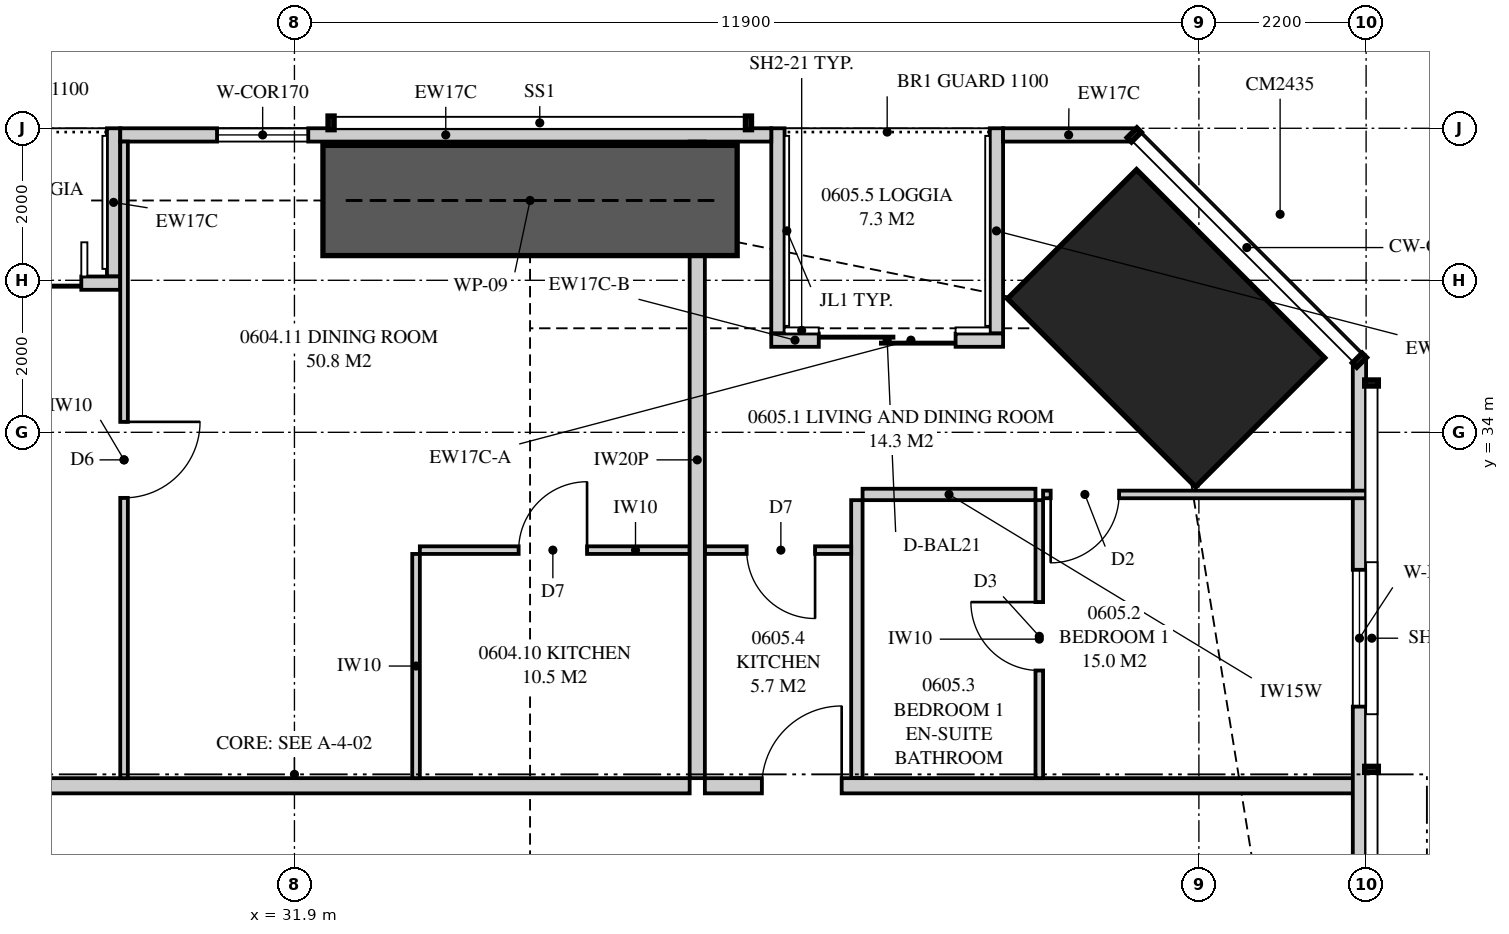
"""IFC4 building model, lengths in metres.
Left out: names, types, materials, properties, quantities, classifications, styles, units other than length and angle.
Written with IfcOpenShell. Run it as: python <this file> out.ifc"""

import sys

from ifc_helpers import new_model, si_unit, direction, frame, frame_2d, origin, origin_2d, place, context, subcontext, project, spatial, polyline, rectangle, outline, extrude, element, fill, save


model = new_model("IFC4")
c1 = context("Model", 3, precision=1e-05, world=origin(), true_north=direction((0.0, 1.0)))
c2 = subcontext(c1, "Body", "Model", "MODEL_VIEW")
j1 = project(units=[si_unit("LENGTHUNIT", "METRE"), si_unit("PLANEANGLEUNIT", "RADIAN")], contexts=[c1])
p1 = place(None, origin())
s1 = spatial("IfcSite", under=j1, at=p1, CompositionType="ELEMENT")
p2 = place(p1, origin())
s2 = spatial("IfcBuilding", under=s1, at=p2, CompositionType="ELEMENT")
p3 = place(p2, frame((0.0, 0.0, 27.7)))
s3 = spatial("IfcBuildingStorey", under=s2, at=p3, CompositionType="ELEMENT", Elevation=27.7)
p4 = place(p3, frame((43.369, 35.369, 0.0), z_axis=(0.0, 0.0, 1.0), x_axis=(-0.707106781187, -0.707106781187, 0.0)))
e1 = element("IfcColumn", 1, at=p4, inside=s3, PredefinedType="COLUMN", context=c2, shape_type="SweptSolid", body=[
    extrude(rectangle(XDim=2.4, YDim=3.5, at=origin_2d()), origin(), (0.0, 0.0, 1.0), 3.35),
])
p5 = place(p3, frame((45.913, 3.051, 0.0), z_axis=(0.0, 0.0, 1.0), x_axis=(0.0, 1.0, 0.0)))
e2 = element("IfcWall", 2, at=p5, inside=s3, PredefinedType="SOLIDWALL", context=c2, shape_type="SweptSolid", body=[
    extrude(outline(polyline([(0.0, 0.0), (31.897, 0.0), (31.897, 3.11), (22.167, 3.11), (22.167, 2.15), (22.074, 2.15), (22.074, 3.11), (21.949, 3.11), (21.949, 2.15), (9.949, 2.15), (9.949, 3.11), (9.823, 3.11), (9.823, 2.15), (9.73, 2.15), (9.73, 3.11), (0.0, 3.11), (0.0, 0.0)])), frame((0.0, 0.087, 0.0), z_axis=(0.0, -1.0, 0.0), x_axis=(1.0, 0.0, 0.0)), (0.0, 0.0, 1.0), 0.175),
])
p6 = place(p5, frame((2.257, 0.0, 0.4)))
e3 = element("IfcOpeningElement", 3, at=p6, cuts=e2, PredefinedType="OPENING", context=c2, shape_type="SweptSolid", body=[
    extrude(rectangle(XDim=1.8, YDim=1.7, at=frame_2d((0.9, 0.85))), frame((0.0, 0.097, 0.0), z_axis=(0.0, -1.0, 0.0), x_axis=(1.0, 0.0, 0.0)), (0.0, 0.0, 1.0), 0.195),
])
p7 = place(p5, frame((14.849, 0.0, 0.4)))
e4 = element("IfcOpeningElement", 4, at=p7, cuts=e2, PredefinedType="OPENING", context=c2, shape_type="SweptSolid", body=[
    extrude(rectangle(XDim=1.2, YDim=1.7, at=frame_2d((0.6, 0.85))), frame((0.0, 0.097, 0.0), z_axis=(0.0, -1.0, 0.0), x_axis=(1.0, 0.0, 0.0)), (0.0, 0.0, 1.0), 0.195),
])
p8 = place(p5, frame((27.34, 0.0, 0.4)))
e5 = element("IfcOpeningElement", 5, at=p8, cuts=e2, PredefinedType="OPENING", context=c2, shape_type="SweptSolid", body=[
    extrude(rectangle(XDim=1.8, YDim=1.7, at=frame_2d((0.9, 0.85))), frame((0.0, 0.097, 0.0), z_axis=(0.0, -1.0, 0.0), x_axis=(1.0, 0.0, 0.0)), (0.0, 0.0, 1.0), 0.195),
])
p9 = place(p3, frame((42.949, 37.913, 0.0), z_axis=(0.0, 0.0, 1.0), x_axis=(-1.0, 0.0, 0.0)))
e6 = element("IfcWall", 6, at=p9, inside=s3, PredefinedType="SOLIDWALL", context=c2, shape_type="SweptSolid", body=[
    extrude(rectangle(XDim=1.725, YDim=0.175, at=frame_2d((0.863, 0.0))), origin(), (0.0, 0.0, 1.0), 3.11),
])
p10 = place(p3, frame((38.174, 37.913, 0.0), z_axis=(0.0, 0.0, 1.0), x_axis=(-1.0, 0.0, 0.0)))
e7 = element("IfcWall", 7, at=p10, inside=s3, PredefinedType="SOLIDWALL", context=c2, shape_type="SweptSolid", body=[
    extrude(outline(polyline([(0.0, 0.0), (8.565, 0.0), (8.565, 2.15), (3.174, 2.15), (3.174, 3.11), (3.018, 3.11), (3.018, 2.15), (2.97, 2.15), (2.97, 3.11), (0.0, 3.11), (0.0, 0.0)])), frame((0.0, 0.087, 0.0), z_axis=(0.0, -1.0, 0.0), x_axis=(1.0, 0.0, 0.0)), (0.0, 0.0, 1.0), 0.175),
])
p11 = place(p10, frame((6.092, 0.0, 0.4)))
e8 = element("IfcOpeningElement", 8, at=p11, cuts=e7, PredefinedType="OPENING", context=c2, shape_type="SweptSolid", body=[
    extrude(rectangle(XDim=1.2, YDim=1.7, at=frame_2d((0.6, 0.85))), frame((0.0, 0.097, 0.0), z_axis=(0.0, -1.0, 0.0), x_axis=(1.0, 0.0, 0.0)), (0.0, 0.0, 1.0), 0.195),
])
p12 = place(p3, frame((41.224, 35.212, 0.0), z_axis=(0.0, 0.0, 1.0), x_axis=(-1.0, 0.0, 0.0)))
e9 = element("IfcWall", 9, at=p12, inside=s3, PredefinedType="SOLIDWALL", context=c2, shape_type="SweptSolid", body=[
    extrude(rectangle(XDim=2.425, YDim=0.175, at=frame_2d((1.212, 0.0))), origin(), (0.0, 0.0, 1.0), 2.15),
])
p13 = place(p12, frame((0.625, 0.0, 0.0)))
e10 = element("IfcOpeningElement", 10, at=p13, cuts=e9, PredefinedType="OPENING", context=c2, shape_type="SweptSolid", body=[
    extrude(rectangle(XDim=1.8, YDim=2.1, at=frame_2d((0.9, 1.05))), frame((0.0, 0.097, 0.0), z_axis=(0.0, -1.0, 0.0), x_axis=(1.0, 0.0, 0.0)), (0.0, 0.0, 1.0), 0.195),
])
p14 = place(p3, frame((38.799, 35.212, 0.0), z_axis=(0.0, 0.0, 1.0), x_axis=(-1.0, 0.0, 0.0)))
e11 = element("IfcWall", 11, at=p14, inside=s3, PredefinedType="SOLIDWALL", context=c2, shape_type="SweptSolid", body=[
    extrude(rectangle(XDim=0.625, YDim=0.175, at=frame_2d((0.312, 0.0))), origin(), (0.0, 0.0, 1.0), 2.51),
])
p15 = place(p3, frame((41.136, 38.0, 0.0), z_axis=(0.0, 0.0, 1.0), x_axis=(0.0, -1.0, 0.0)))
e12 = element("IfcWall", 12, at=p15, inside=s3, PredefinedType="SOLIDWALL", context=c2, shape_type="SweptSolid", body=[
    extrude(outline(polyline([(0.0, 0.0), (2.7, 0.0), (2.7, 2.15), (1.349, 2.15), (1.349, 3.11), (0.0, 3.11), (0.0, 0.0)])), frame((0.0, 0.087, 0.0), z_axis=(0.0, -1.0, 0.0), x_axis=(1.0, 0.0, 0.0)), (0.0, 0.0, 1.0), 0.175),
])
p16 = place(p3, frame((38.261, 38.0, 0.0), z_axis=(0.0, 0.0, 1.0), x_axis=(0.0, -1.0, 0.0)))
e13 = element("IfcWall", 13, at=p16, inside=s3, PredefinedType="SOLIDWALL", context=c2, shape_type="SweptSolid", body=[
    extrude(outline(polyline([(0.0, 0.0), (2.7, 0.0), (2.7, 2.51), (2.439, 2.51), (2.439, 2.15), (0.772, 2.15), (0.772, 3.11), (0.0, 3.11), (0.0, 0.0)])), frame((0.0, 0.087, 0.0), z_axis=(0.0, -1.0, 0.0), x_axis=(1.0, 0.0, 0.0)), (0.0, 0.0, 1.0), 0.175),
])
p17 = place(p3, frame((29.608, 35.962, 0.0), z_axis=(0.0, 0.0, 1.0), x_axis=(-1.0, 0.0, 0.0)))
e14 = element("IfcWall", 14, at=p17, inside=s3, PredefinedType="SOLIDWALL", context=c2, shape_type="SweptSolid", body=[
    extrude(rectangle(XDim=2.825, YDim=0.175, at=frame_2d((1.413, 0.0))), origin(), (0.0, 0.0, 1.0), 3.11),
])
p18 = place(p17, frame((0.512, 0.0, 0.0)))
e15 = element("IfcOpeningElement", 15, at=p18, cuts=e14, PredefinedType="OPENING", context=c2, shape_type="SweptSolid", body=[
    extrude(rectangle(XDim=1.8, YDim=2.1, at=frame_2d((0.9, 1.05))), frame((0.0, 0.097, 0.0), z_axis=(0.0, -1.0, 0.0), x_axis=(1.0, 0.0, 0.0)), (0.0, 0.0, 1.0), 0.195),
])
p19 = place(p3, frame((29.521, 38.0, 0.0), z_axis=(0.0, 0.0, 1.0), x_axis=(0.0, -1.0, 0.0)))
e16 = element("IfcWall", 16, at=p19, inside=s3, PredefinedType="SOLIDWALL", context=c2, shape_type="SweptSolid", body=[
    extrude(outline(polyline([(0.0, 0.0), (1.95, 0.0), (1.95, 3.11), (1.75, 3.11), (1.75, 2.15), (0.15, 2.15), (0.15, 3.11), (0.0, 3.11), (0.0, 0.0)])), frame((0.0, 0.087, 0.0), z_axis=(0.0, -1.0, 0.0), x_axis=(1.0, 0.0, 0.0)), (0.0, 0.0, 1.0), 0.175),
])
p20 = place(p3, frame((37.2, 37.825, 0.0), z_axis=(0.0, 0.0, 1.0), x_axis=(0.0, -1.0, 0.0)))
e17 = element("IfcWall", 17, at=p20, inside=s3, PredefinedType="PARTITIONING", context=c2, shape_type="SweptSolid", body=[
    extrude(outline(polyline([(0.0, 0.0), (8.375, 0.0), (8.375, 3.11), (3.766, 3.11), (3.766, 2.51), (2.145, 2.51), (2.145, 2.15), (0.289, 2.15), (0.289, 3.11), (0.0, 3.11), (0.0, 0.0)])), frame((0.0, 0.1, 0.0), z_axis=(0.0, -1.0, 0.0), x_axis=(1.0, 0.0, 0.0)), (0.0, 0.0, 1.0), 0.2),
])
p21 = place(p3, frame((33.55, 32.45, 0.0), z_axis=(0.0, 0.0, 1.0), x_axis=(1.0, 0.0, 0.0)))
e18 = element("IfcWall", 18, at=p21, inside=s3, PredefinedType="PARTITIONING", context=c2, shape_type="SweptSolid", body=[
    extrude(outline(polyline([(0.0, 0.0), (3.55, 0.0), (3.55, 3.11), (1.737, 3.11), (1.737, 2.541), (1.163, 2.541), (1.163, 3.11), (0.0, 3.11), (0.0, 0.0)])), frame((0.0, 0.05, 0.0), z_axis=(0.0, -1.0, 0.0), x_axis=(1.0, 0.0, 0.0)), (0.0, 0.0, 1.0), 0.1),
])
p22 = place(p21, frame((1.3, 0.0, 0.0)))
e19 = element("IfcOpeningElement", 19, at=p22, cuts=e18, PredefinedType="OPENING", context=c2, shape_type="SweptSolid", body=[
    extrude(rectangle(XDim=0.9, YDim=2.1, at=frame_2d((0.45, 1.05))), frame((0.0, 0.06, 0.0), z_axis=(0.0, -1.0, 0.0), x_axis=(1.0, 0.0, 0.0)), (0.0, 0.0, 1.0), 0.12),
])
p23 = place(p3, frame((33.5, 32.4, 0.0), z_axis=(0.0, 0.0, 1.0), x_axis=(0.0, -1.0, 0.0)))
e20 = element("IfcWall", 20, at=p23, inside=s3, PredefinedType="PARTITIONING", context=c2, shape_type="SweptSolid", body=[
    extrude(rectangle(XDim=2.95, YDim=0.1, at=frame_2d((1.475, 0.0))), origin(), (0.0, 0.0, 1.0), 3.11),
])
p24 = place(p3, frame((29.658, 37.825, 0.0), z_axis=(0.0, 0.0, 1.0), x_axis=(0.0, -1.0, 0.0)))
e21 = element("IfcWall", 21, at=p24, inside=s3, PredefinedType="PARTITIONING", context=c2, shape_type="SweptSolid", body=[
    extrude(outline(polyline([(0.0, 0.0), (8.375, 0.0), (8.375, 3.11), (1.635, 3.11), (1.635, 2.15), (0.0, 2.15), (0.0, 3.11), (0.0, 0.0)])), frame((0.0, 0.05, 0.0), z_axis=(0.0, -1.0, 0.0), x_axis=(1.0, 0.0, 0.0)), (0.0, 0.0, 1.0), 0.1),
])
p25 = place(p24, frame((3.688, 0.0, 0.0)))
e22 = element("IfcOpeningElement", 22, at=p25, cuts=e21, PredefinedType="OPENING", context=c2, shape_type="SweptSolid", body=[
    extrude(rectangle(XDim=1.0, YDim=2.1, at=frame_2d((0.5, 1.05))), frame((0.0, 0.06, 0.0), z_axis=(0.0, -1.0, 0.0), x_axis=(1.0, 0.0, 0.0)), (0.0, 0.0, 1.0), 0.12),
])
p26 = place(p3, frame((37.3, 29.35, 0.0), z_axis=(0.0, 0.0, 1.0), x_axis=(1.0, 0.0, 0.0)))
e23 = element("IfcWall", 23, at=p26, inside=s3, PredefinedType="PARTITIONING", context=c2, shape_type="SweptSolid", body=[
    extrude(outline(polyline([(0.0, 0.0), (8.7, 0.0), (8.7, 3.11), (7.967, 3.11), (7.967, 2.15), (6.123, 2.15), (6.123, 3.11), (0.0, 3.11), (0.0, 0.0)])), frame((0.0, 0.1, 0.0), z_axis=(0.0, -1.0, 0.0), x_axis=(1.0, 0.0, 0.0)), (0.0, 0.0, 1.0), 0.2),
])
p27 = place(p26, frame((0.75, 0.0, 0.0)))
e24 = element("IfcOpeningElement", 24, at=p27, cuts=e23, PredefinedType="OPENING", context=c2, shape_type="SweptSolid", body=[
    extrude(rectangle(XDim=1.05, YDim=2.2, at=frame_2d((0.525, 1.1))), frame((0.0, 0.11, 0.0), z_axis=(0.0, -1.0, 0.0), x_axis=(1.0, 0.0, 0.0)), (0.0, 0.0, 1.0), 0.22),
])
p28 = place(p3, frame((41.7, 33.108, 0.0), z_axis=(0.0, 0.0, 1.0), x_axis=(0.0, -1.0, 0.0)))
e25 = element("IfcWall", 25, at=p28, inside=s3, PredefinedType="PARTITIONING", context=c2, shape_type="SweptSolid", body=[
    extrude(rectangle(XDim=3.658, YDim=0.1, at=frame_2d((1.829, 0.0))), origin(), (0.0, 0.0, 1.0), 3.11),
])
p29 = place(p28, frame((1.341, 0.0, 0.0)))
e26 = element("IfcOpeningElement", 26, at=p29, cuts=e25, PredefinedType="OPENING", context=c2, shape_type="SweptSolid", body=[
    extrude(rectangle(XDim=0.9, YDim=2.1, at=frame_2d((0.45, 1.05))), frame((0.0, 0.06, 0.0), z_axis=(0.0, -1.0, 0.0), x_axis=(1.0, 0.0, 0.0)), (0.0, 0.0, 1.0), 0.12),
])
p30 = place(p3, frame((41.75, 33.183, 0.0), z_axis=(0.0, 0.0, 1.0), x_axis=(1.0, 0.0, 0.0)))
e27 = element("IfcWall", 27, at=p30, inside=s3, PredefinedType="PARTITIONING", context=c2, shape_type="SweptSolid", body=[
    extrude(outline(polyline([(0.0, 0.0), (4.25, 0.0), (4.25, 3.11), (2.844, 3.11), (2.844, 2.15), (1.102, 2.15), (1.102, 3.11), (0.0, 3.11), (0.0, 0.0)])), frame((0.0, 0.05, 0.0), z_axis=(0.0, -1.0, 0.0), x_axis=(1.0, 0.0, 0.0)), (0.0, 0.0, 1.0), 0.1),
])
p31 = place(p30, frame((0.1, 0.0, 0.0)))
e28 = element("IfcOpeningElement", 28, at=p31, cuts=e27, PredefinedType="OPENING", context=c2, shape_type="SweptSolid", body=[
    extrude(rectangle(XDim=0.9, YDim=2.1, at=frame_2d((0.45, 1.05))), frame((0.0, 0.06, 0.0), z_axis=(0.0, -1.0, 0.0), x_axis=(1.0, 0.0, 0.0)), (0.0, 0.0, 1.0), 0.12),
])
p32 = place(p3, frame((39.375, 33.183, 0.0), z_axis=(0.0, 0.0, 1.0), x_axis=(1.0, 0.0, 0.0)))
e29 = element("IfcWall", 29, at=p32, inside=s3, PredefinedType="PLUMBINGWALL", context=c2, shape_type="SweptSolid", body=[
    extrude(rectangle(XDim=2.275, YDim=0.15, at=frame_2d((1.137, 0.0))), origin(), (0.0, 0.0, 1.0), 3.11),
])
p33 = place(p3, frame((39.3, 33.108, 0.0), z_axis=(0.0, 0.0, 1.0), x_axis=(0.0, -1.0, 0.0)))
e30 = element("IfcWall", 30, at=p33, inside=s3, PredefinedType="PLUMBINGWALL", context=c2, shape_type="SweptSolid", body=[
    extrude(rectangle(XDim=3.658, YDim=0.15, at=frame_2d((1.829, 0.0))), origin(), (0.0, 0.0, 1.0), 3.11),
])
p34 = place(p3, frame((37.3, 32.45, 0.0), z_axis=(0.0, 0.0, 1.0), x_axis=(1.0, 0.0, 0.0)))
e31 = element("IfcWall", 31, at=p34, inside=s3, PredefinedType="PARTITIONING", context=c2, shape_type="SweptSolid", body=[
    extrude(rectangle(XDim=1.925, YDim=0.1, at=frame_2d((0.962, 0.0))), origin(), (0.0, 0.0, 1.0), 3.11),
])
p35 = place(p34, frame((0.55, 0.0, 0.0)))
e32 = element("IfcOpeningElement", 32, at=p35, cuts=e31, PredefinedType="OPENING", context=c2, shape_type="SweptSolid", body=[
    extrude(rectangle(XDim=0.9, YDim=2.1, at=frame_2d((0.45, 1.05))), frame((0.0, 0.06, 0.0), z_axis=(0.0, -1.0, 0.0), x_axis=(1.0, 0.0, 0.0)), (0.0, 0.0, 1.0), 0.12),
])
p36 = place(p3, frame((24.05, 29.35, 0.0), z_axis=(0.0, 0.0, 1.0), x_axis=(1.0, 0.0, 0.0)))
e33 = element("IfcWall", 33, at=p36, inside=s3, PredefinedType="PARTITIONING", context=c2, shape_type="SweptSolid", body=[
    extrude(outline(polyline([(0.0, 0.0), (13.05, 0.0), (13.05, 3.11), (11.287, 3.11), (11.287, 2.541), (10.613, 2.541), (10.613, 3.11), (0.287, 3.11), (0.287, 2.541), (0.0, 2.541), (0.0, 3.11), (0.0, 0.0)])), frame((0.0, 0.1, 0.0), z_axis=(0.0, -1.0, 0.0), x_axis=(1.0, 0.0, 0.0)), (0.0, 0.0, 1.0), 0.2),
])
p37 = place(p3, frame((32.275, 37.05, 0.0), z_axis=(0.0, 0.0, 1.0), x_axis=(1.0, 0.0, 0.0)))
e34 = element("IfcWall", 34, at=p37, inside=s3, PredefinedType="SHEAR", context=c2, shape_type="SweptSolid", body=[
    extrude(rectangle(XDim=5.45, YDim=1.45, at=frame_2d((2.725, 0.0))), origin(), (0.0, 0.0, 1.0), 3.35),
])
p38 = place(p8, origin())
e35 = element("IfcWindow", 35, at=p38, inside=s3, PartitioningType="SINGLE_PANEL", PredefinedType="WINDOW", context=c2, shape_type="SweptSolid", body=[
    extrude(rectangle(XDim=1.8, YDim=1.7, at=frame_2d((0.9, 0.85))), frame((0.0, 0.03, 0.0), z_axis=(0.0, -1.0, 0.0), x_axis=(1.0, 0.0, 0.0)), (0.0, 0.0, 1.0), 0.06),
])
fill(e5, e35)
p39 = place(p13, origin())
e36 = element("IfcDoor", 36, at=p39, inside=s3, OperationType="SLIDING_TO_LEFT", PredefinedType="DOOR", context=c2, shape_type="SweptSolid", body=[
    extrude(rectangle(XDim=1.8, YDim=2.1, at=frame_2d((0.9, 1.05))), frame((0.0, 0.025, 0.0), z_axis=(0.0, -1.0, 0.0), x_axis=(1.0, 0.0, 0.0)), (0.0, 0.0, 1.0), 0.05),
])
fill(e10, e36)
p40 = place(p11, origin())
e37 = element("IfcWindow", 37, at=p40, inside=s3, PartitioningType="SINGLE_PANEL", PredefinedType="WINDOW", context=c2, shape_type="SweptSolid", body=[
    extrude(rectangle(XDim=1.2, YDim=1.7, at=frame_2d((0.6, 0.85))), frame((0.0, 0.03, 0.0), z_axis=(0.0, -1.0, 0.0), x_axis=(1.0, 0.0, 0.0)), (0.0, 0.0, 1.0), 0.06),
])
fill(e8, e37)
p41 = place(p18, origin())
e38 = element("IfcDoor", 38, at=p41, inside=s3, OperationType="SLIDING_TO_LEFT", PredefinedType="DOOR", context=c2, shape_type="SweptSolid", body=[
    extrude(rectangle(XDim=1.8, YDim=2.1, at=frame_2d((0.9, 1.05))), frame((0.0, 0.025, 0.0), z_axis=(0.0, -1.0, 0.0), x_axis=(1.0, 0.0, 0.0)), (0.0, 0.0, 1.0), 0.05),
])
fill(e15, e38)
p42 = place(p22, origin())
e39 = element("IfcDoor", 39, at=p42, inside=s3, OperationType="SINGLE_SWING_RIGHT", PredefinedType="DOOR", context=c2, shape_type="SweptSolid", body=[
    extrude(rectangle(XDim=0.9, YDim=2.1, at=frame_2d((0.45, 1.05))), frame((0.0, 0.025, 0.0), z_axis=(0.0, -1.0, 0.0), x_axis=(1.0, 0.0, 0.0)), (0.0, 0.0, 1.0), 0.05),
])
fill(e19, e39)
p43 = place(p25, origin())
e40 = element("IfcDoor", 40, at=p43, inside=s3, OperationType="SINGLE_SWING_LEFT", PredefinedType="DOOR", context=c2, shape_type="SweptSolid", body=[
    extrude(rectangle(XDim=1.0, YDim=2.1, at=frame_2d((0.5, 1.05))), frame((0.0, 0.025, 0.0), z_axis=(0.0, -1.0, 0.0), x_axis=(1.0, 0.0, 0.0)), (0.0, 0.0, 1.0), 0.05),
])
fill(e22, e40)
p44 = place(p27, origin())
e41 = element("IfcDoor", 41, at=p44, inside=s3, OperationType="SINGLE_SWING_RIGHT", PredefinedType="DOOR", context=c2, shape_type="SweptSolid", body=[
    extrude(rectangle(XDim=1.05, YDim=2.2, at=frame_2d((0.525, 1.1))), frame((0.0, 0.025, 0.0), z_axis=(0.0, -1.0, 0.0), x_axis=(1.0, 0.0, 0.0)), (0.0, 0.0, 1.0), 0.05),
])
fill(e24, e41)
p45 = place(p31, frame((0.9, 0.0, 0.0), z_axis=(0.0, 0.0, 1.0), x_axis=(-1.0, 0.0, 0.0)))
e42 = element("IfcDoor", 42, at=p45, inside=s3, OperationType="SINGLE_SWING_RIGHT", PredefinedType="DOOR", context=c2, shape_type="SweptSolid", body=[
    extrude(rectangle(XDim=0.9, YDim=2.1, at=frame_2d((0.45, 1.05))), frame((0.0, 0.025, 0.0), z_axis=(0.0, -1.0, 0.0), x_axis=(1.0, 0.0, 0.0)), (0.0, 0.0, 1.0), 0.05),
])
fill(e28, e42)
p46 = place(p29, frame((0.9, 0.0, 0.0), z_axis=(0.0, 0.0, 1.0), x_axis=(-1.0, 0.0, 0.0)))
e43 = element("IfcDoor", 43, at=p46, inside=s3, OperationType="SINGLE_SWING_RIGHT", PredefinedType="DOOR", context=c2, shape_type="SweptSolid", body=[
    extrude(rectangle(XDim=0.9, YDim=2.1, at=frame_2d((0.45, 1.05))), frame((0.0, 0.025, 0.0), z_axis=(0.0, -1.0, 0.0), x_axis=(1.0, 0.0, 0.0)), (0.0, 0.0, 1.0), 0.05),
])
fill(e26, e43)
p47 = place(p35, frame((0.9, 0.0, 0.0), z_axis=(0.0, 0.0, 1.0), x_axis=(-1.0, 0.0, 0.0)))
e44 = element("IfcDoor", 44, at=p47, inside=s3, OperationType="SINGLE_SWING_LEFT", PredefinedType="DOOR", context=c2, shape_type="SweptSolid", body=[
    extrude(rectangle(XDim=0.9, YDim=2.1, at=frame_2d((0.45, 1.05))), frame((0.0, 0.025, 0.0), z_axis=(0.0, -1.0, 0.0), x_axis=(1.0, 0.0, 0.0)), (0.0, 0.0, 1.0), 0.05),
])
fill(e32, e44)
save(model, sys.argv[1])
